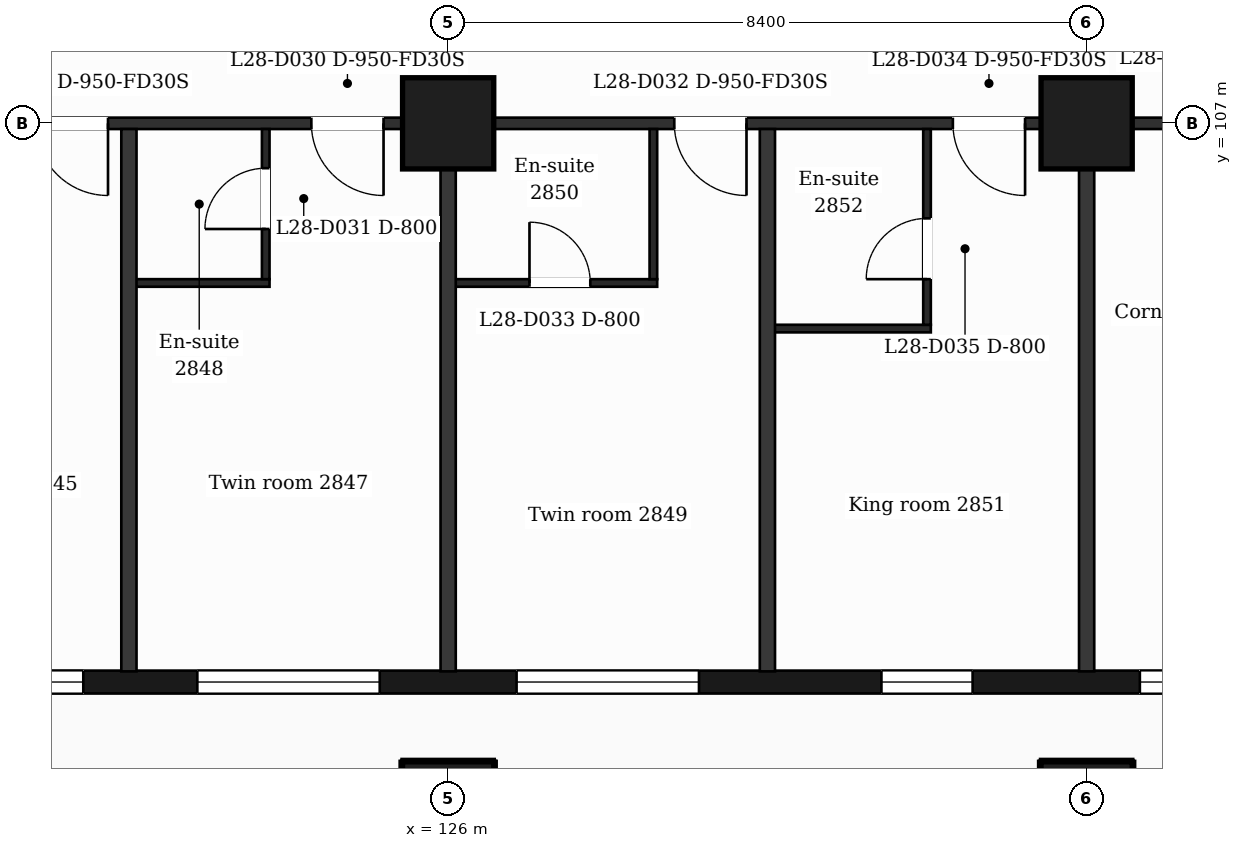
"""IFC4 building model, lengths in metres.
Left out: names, types, materials, properties, quantities, classifications, styles, units other than length and angle.
Written with IfcOpenShell. Run it as: python <this file> out.ifc"""

import sys

from ifc_helpers import new_model, si_unit, direction, frame, frame_2d, origin, origin_2d, place, context, subcontext, project, spatial, rectangle, extrude, element, fill, save


model = new_model("IFC4")
c1 = context("Model", 3, precision=1e-05, world=origin(), true_north=direction((0.0, 1.0)))
c2 = subcontext(c1, "Body", "Model", "MODEL_VIEW")
j1 = project(units=[si_unit("LENGTHUNIT", "METRE"), si_unit("PLANEANGLEUNIT", "RADIAN")], contexts=[c1])
p1 = place(None, origin())
s1 = spatial("IfcSite", under=j1, at=p1, CompositionType="ELEMENT")
p2 = place(p1, origin())
s2 = spatial("IfcBuilding", under=s1, at=p2, CompositionType="ELEMENT")
p3 = place(p2, frame((0.0, 0.0, 120.6)))
s3 = spatial("IfcBuildingStorey", under=s2, at=p3, CompositionType="ELEMENT", Elevation=120.6)
for number, where, z_axis, x_axis in (
    (1, (126.0, 98.0, 0.0), (0.0, 0.0, 1.0), (1.0, 0.0, 0.0)),
    (2, (134.4, 98.0, 0.0), (0.0, 0.0, 1.0), (1.0, 0.0, 0.0)),
    (3, (126.0, 107.0, 0.0), (0.0, 0.0, 1.0), (1.0, 0.0, 0.0)),
    (4, (134.4, 107.0, 0.0), (0.0, 0.0, 1.0), (1.0, 0.0, 0.0)),
):
    element("IfcColumn", number, at=place(p3, frame(where, z_axis=z_axis, x_axis=x_axis)), inside=s3, PredefinedType="COLUMN", context=c2, shape_type="SweptSolid", body=[
        extrude(rectangle(XDim=1.2, YDim=1.2, at=origin_2d()), origin(), (0.0, 0.0, 1.0), 3.7),
    ])
p4 = place(p3, frame((89.85, 99.65, 0.0), z_axis=(0.0, 0.0, 1.0), x_axis=(1.0, 0.0, 0.0)))
e5 = element("IfcWall", 5, at=p4, inside=s3, PredefinedType="SOLIDWALL", context=c2, shape_type="SweptSolid", body=[
    extrude(rectangle(XDim=47.25, YDim=0.3, at=frame_2d((23.625, 0.0))), origin(), (0.0, 0.0, 1.0), 3.38),
])
p5 = place(p4, frame((0.725, 0.0, 0.9)))
e6 = element("IfcOpeningElement", 6, at=p5, cuts=e5, PredefinedType="OPENING", context=c2, shape_type="SweptSolid", body=[
    extrude(rectangle(XDim=1.2, YDim=2.1, at=frame_2d((0.6, 1.05))), frame((0.0, 0.16, 0.0), z_axis=(0.0, -1.0, 0.0), x_axis=(1.0, 0.0, 0.0)), (0.0, 0.0, 1.0), 0.32),
])
p6 = place(p4, frame((3.45, 0.0, 0.9)))
e7 = element("IfcOpeningElement", 7, at=p6, cuts=e5, PredefinedType="OPENING", context=c2, shape_type="SweptSolid", body=[
    extrude(rectangle(XDim=2.4, YDim=2.1, at=frame_2d((1.2, 1.05))), frame((0.0, 0.16, 0.0), z_axis=(0.0, -1.0, 0.0), x_axis=(1.0, 0.0, 0.0)), (0.0, 0.0, 1.0), 0.32),
])
p7 = place(p4, frame((7.65, 0.0, 0.9)))
e8 = element("IfcOpeningElement", 8, at=p7, cuts=e5, PredefinedType="OPENING", context=c2, shape_type="SweptSolid", body=[
    extrude(rectangle(XDim=2.4, YDim=2.1, at=frame_2d((1.2, 1.05))), frame((0.0, 0.16, 0.0), z_axis=(0.0, -1.0, 0.0), x_axis=(1.0, 0.0, 0.0)), (0.0, 0.0, 1.0), 0.32),
])
p8 = place(p4, frame((12.45, 0.0, 0.9)))
e9 = element("IfcOpeningElement", 9, at=p8, cuts=e5, PredefinedType="OPENING", context=c2, shape_type="SweptSolid", body=[
    extrude(rectangle(XDim=1.2, YDim=2.1, at=frame_2d((0.6, 1.05))), frame((0.0, 0.16, 0.0), z_axis=(0.0, -1.0, 0.0), x_axis=(1.0, 0.0, 0.0)), (0.0, 0.0, 1.0), 0.32),
])
p9 = place(p4, frame((16.65, 0.0, 0.9)))
e10 = element("IfcOpeningElement", 10, at=p9, cuts=e5, PredefinedType="OPENING", context=c2, shape_type="SweptSolid", body=[
    extrude(rectangle(XDim=1.2, YDim=2.1, at=frame_2d((0.6, 1.05))), frame((0.0, 0.16, 0.0), z_axis=(0.0, -1.0, 0.0), x_axis=(1.0, 0.0, 0.0)), (0.0, 0.0, 1.0), 0.32),
])
p10 = place(p4, frame((19.95, 0.0, 0.0)))
e11 = element("IfcOpeningElement", 11, at=p10, cuts=e5, PredefinedType="OPENING", context=c2, shape_type="SweptSolid", body=[
    extrude(rectangle(XDim=1.2, YDim=2.4, at=frame_2d((0.6, 1.2))), frame((0.0, 0.16, 0.0), z_axis=(0.0, -1.0, 0.0), x_axis=(1.0, 0.0, 0.0)), (0.0, 0.0, 1.0), 0.32),
])
p11 = place(p4, frame((21.75, 0.0, 0.9)))
e12 = element("IfcOpeningElement", 12, at=p11, cuts=e5, PredefinedType="OPENING", context=c2, shape_type="SweptSolid", body=[
    extrude(rectangle(XDim=1.2, YDim=2.1, at=frame_2d((0.6, 1.05))), frame((0.0, 0.16, 0.0), z_axis=(0.0, -1.0, 0.0), x_axis=(1.0, 0.0, 0.0)), (0.0, 0.0, 1.0), 0.32),
])
p12 = place(p4, frame((24.45, 0.0, 0.9)))
e13 = element("IfcOpeningElement", 13, at=p12, cuts=e5, PredefinedType="OPENING", context=c2, shape_type="SweptSolid", body=[
    extrude(rectangle(XDim=2.4, YDim=2.1, at=frame_2d((1.2, 1.05))), frame((0.0, 0.16, 0.0), z_axis=(0.0, -1.0, 0.0), x_axis=(1.0, 0.0, 0.0)), (0.0, 0.0, 1.0), 0.32),
])
p13 = place(p4, frame((28.35, 0.0, 0.0)))
e14 = element("IfcOpeningElement", 14, at=p13, cuts=e5, PredefinedType="OPENING", context=c2, shape_type="SweptSolid", body=[
    extrude(rectangle(XDim=1.2, YDim=2.4, at=frame_2d((0.6, 1.2))), frame((0.0, 0.16, 0.0), z_axis=(0.0, -1.0, 0.0), x_axis=(1.0, 0.0, 0.0)), (0.0, 0.0, 1.0), 0.32),
])
p14 = place(p4, frame((30.15, 0.0, 0.9)))
e15 = element("IfcOpeningElement", 15, at=p14, cuts=e5, PredefinedType="OPENING", context=c2, shape_type="SweptSolid", body=[
    extrude(rectangle(XDim=1.2, YDim=2.1, at=frame_2d((0.6, 1.05))), frame((0.0, 0.16, 0.0), z_axis=(0.0, -1.0, 0.0), x_axis=(1.0, 0.0, 0.0)), (0.0, 0.0, 1.0), 0.32),
])
p15 = place(p4, frame((32.85, 0.0, 0.9)))
e16 = element("IfcOpeningElement", 16, at=p15, cuts=e5, PredefinedType="OPENING", context=c2, shape_type="SweptSolid", body=[
    extrude(rectangle(XDim=2.4, YDim=2.1, at=frame_2d((1.2, 1.05))), frame((0.0, 0.16, 0.0), z_axis=(0.0, -1.0, 0.0), x_axis=(1.0, 0.0, 0.0)), (0.0, 0.0, 1.0), 0.32),
])
p16 = place(p4, frame((37.05, 0.0, 0.9)))
e17 = element("IfcOpeningElement", 17, at=p16, cuts=e5, PredefinedType="OPENING", context=c2, shape_type="SweptSolid", body=[
    extrude(rectangle(XDim=2.4, YDim=2.1, at=frame_2d((1.2, 1.05))), frame((0.0, 0.16, 0.0), z_axis=(0.0, -1.0, 0.0), x_axis=(1.0, 0.0, 0.0)), (0.0, 0.0, 1.0), 0.32),
])
p17 = place(p4, frame((41.85, 0.0, 0.9)))
e18 = element("IfcOpeningElement", 18, at=p17, cuts=e5, PredefinedType="OPENING", context=c2, shape_type="SweptSolid", body=[
    extrude(rectangle(XDim=1.2, YDim=2.1, at=frame_2d((0.6, 1.05))), frame((0.0, 0.16, 0.0), z_axis=(0.0, -1.0, 0.0), x_axis=(1.0, 0.0, 0.0)), (0.0, 0.0, 1.0), 0.32),
])
p18 = place(p4, frame((45.25, 0.0, 0.9)))
e19 = element("IfcOpeningElement", 19, at=p18, cuts=e5, PredefinedType="OPENING", context=c2, shape_type="SweptSolid", body=[
    extrude(rectangle(XDim=1.2, YDim=2.1, at=frame_2d((0.6, 1.05))), frame((0.0, 0.16, 0.0), z_axis=(0.0, -1.0, 0.0), x_axis=(1.0, 0.0, 0.0)), (0.0, 0.0, 1.0), 0.32),
])
p19 = place(p3, frame((130.2, 104.3, 0.0), z_axis=(0.0, 0.0, 1.0), x_axis=(1.0, 0.0, 0.0)))
e20 = element("IfcWall", 20, at=p19, inside=s3, PredefinedType="PARTITIONING", context=c2, shape_type="SweptSolid", body=[
    extrude(rectangle(XDim=2.15, YDim=0.1, at=frame_2d((1.075, 0.0))), origin(), (0.0, 0.0, 1.0), 3.38),
])
p20 = place(p3, frame((121.8, 104.9, 0.0), z_axis=(0.0, 0.0, 1.0), x_axis=(1.0, 0.0, 0.0)))
e21 = element("IfcWall", 21, at=p20, inside=s3, PredefinedType="PARTITIONING", context=c2, shape_type="SweptSolid", body=[
    extrude(rectangle(XDim=1.85, YDim=0.1, at=frame_2d((0.925, 0.0))), origin(), (0.0, 0.0, 1.0), 3.38),
])
p21 = place(p3, frame((126.0, 104.9, 0.0), z_axis=(0.0, 0.0, 1.0), x_axis=(1.0, 0.0, 0.0)))
e22 = element("IfcWall", 22, at=p21, inside=s3, PredefinedType="PARTITIONING", context=c2, shape_type="SweptSolid", body=[
    extrude(rectangle(XDim=2.75, YDim=0.1, at=frame_2d((1.375, 0.0))), origin(), (0.0, 0.0, 1.0), 3.38),
])
p22 = place(p21, frame((1.07, 0.0, 0.0)))
e23 = element("IfcOpeningElement", 23, at=p22, cuts=e22, PredefinedType="OPENING", context=c2, shape_type="SweptSolid", body=[
    extrude(rectangle(XDim=0.8, YDim=2.1, at=frame_2d((0.4, 1.05))), frame((0.0, 0.06, 0.0), z_axis=(0.0, -1.0, 0.0), x_axis=(1.0, 0.0, 0.0)), (0.0, 0.0, 1.0), 0.12),
])
p23 = place(p3, frame((87.018, 107.0, 0.0), z_axis=(0.0, 0.0, 1.0), x_axis=(1.0, 0.0, 0.0)))
e24 = element("IfcWall", 24, at=p23, inside=s3, PredefinedType="PARTITIONING", context=c2, shape_type="SweptSolid", body=[
    extrude(rectangle(XDim=52.765, YDim=0.15, at=frame_2d((26.382, 0.0))), origin(), (0.0, 0.0, 1.0), 3.38),
])
p24 = place(p23, frame((1.276, 0.0, 0.0)))
e25 = element("IfcOpeningElement", 25, at=p24, cuts=e24, PredefinedType="OPENING", context=c2, shape_type="SweptSolid", body=[
    extrude(rectangle(XDim=0.95, YDim=2.1, at=frame_2d((0.475, 1.05))), frame((0.0, 0.085, 0.0), z_axis=(0.0, -1.0, 0.0), x_axis=(1.0, 0.0, 0.0)), (0.0, 0.0, 1.0), 0.17),
])
p25 = place(p23, frame((6.192, 0.0, 0.0)))
e26 = element("IfcOpeningElement", 26, at=p25, cuts=e24, PredefinedType="OPENING", context=c2, shape_type="SweptSolid", body=[
    extrude(rectangle(XDim=0.95, YDim=2.1, at=frame_2d((0.475, 1.05))), frame((0.0, 0.085, 0.0), z_axis=(0.0, -1.0, 0.0), x_axis=(1.0, 0.0, 0.0)), (0.0, 0.0, 1.0), 0.17),
])
p26 = place(p23, frame((11.982, 0.0, 0.0)))
e27 = element("IfcOpeningElement", 27, at=p26, cuts=e24, PredefinedType="OPENING", context=c2, shape_type="SweptSolid", body=[
    extrude(rectangle(XDim=1.0, YDim=2.1, at=frame_2d((0.5, 1.05))), frame((0.0, 0.085, 0.0), z_axis=(0.0, -1.0, 0.0), x_axis=(1.0, 0.0, 0.0)), (0.0, 0.0, 1.0), 0.17),
])
p27 = place(p23, frame((14.582, 0.0, 0.0)))
e28 = element("IfcOpeningElement", 28, at=p27, cuts=e24, PredefinedType="OPENING", context=c2, shape_type="SweptSolid", body=[
    extrude(rectangle(XDim=0.95, YDim=2.1, at=frame_2d((0.475, 1.05))), frame((0.0, 0.085, 0.0), z_axis=(0.0, -1.0, 0.0), x_axis=(1.0, 0.0, 0.0)), (0.0, 0.0, 1.0), 0.17),
])
p28 = place(p23, frame((18.257, 0.0, 0.0)))
e29 = element("IfcOpeningElement", 29, at=p28, cuts=e24, PredefinedType="OPENING", context=c2, shape_type="SweptSolid", body=[
    extrude(rectangle(XDim=0.95, YDim=2.1, at=frame_2d((0.475, 1.05))), frame((0.0, 0.085, 0.0), z_axis=(0.0, -1.0, 0.0), x_axis=(1.0, 0.0, 0.0)), (0.0, 0.0, 1.0), 0.17),
])
p29 = place(p23, frame((22.992, 0.0, 0.0)))
e30 = element("IfcOpeningElement", 30, at=p29, cuts=e24, PredefinedType="OPENING", context=c2, shape_type="SweptSolid", body=[
    extrude(rectangle(XDim=0.95, YDim=2.1, at=frame_2d((0.475, 1.05))), frame((0.0, 0.085, 0.0), z_axis=(0.0, -1.0, 0.0), x_axis=(1.0, 0.0, 0.0)), (0.0, 0.0, 1.0), 0.17),
])
p30 = place(p23, frame((26.632, 0.0, 0.0)))
e31 = element("IfcOpeningElement", 31, at=p30, cuts=e24, PredefinedType="OPENING", context=c2, shape_type="SweptSolid", body=[
    extrude(rectangle(XDim=1.0, YDim=2.1, at=frame_2d((0.5, 1.05))), frame((0.0, 0.085, 0.0), z_axis=(0.0, -1.0, 0.0), x_axis=(1.0, 0.0, 0.0)), (0.0, 0.0, 1.0), 0.17),
])
p31 = place(p23, frame((33.557, 0.0, 0.0)))
e32 = element("IfcOpeningElement", 32, at=p31, cuts=e24, PredefinedType="OPENING", context=c2, shape_type="SweptSolid", body=[
    extrude(rectangle(XDim=0.95, YDim=2.1, at=frame_2d((0.475, 1.05))), frame((0.0, 0.085, 0.0), z_axis=(0.0, -1.0, 0.0), x_axis=(1.0, 0.0, 0.0)), (0.0, 0.0, 1.0), 0.17),
])
p32 = place(p23, frame((37.182, 0.0, 0.0)))
e33 = element("IfcOpeningElement", 33, at=p32, cuts=e24, PredefinedType="OPENING", context=c2, shape_type="SweptSolid", body=[
    extrude(rectangle(XDim=0.95, YDim=2.1, at=frame_2d((0.475, 1.05))), frame((0.0, 0.085, 0.0), z_axis=(0.0, -1.0, 0.0), x_axis=(1.0, 0.0, 0.0)), (0.0, 0.0, 1.0), 0.17),
])
p33 = place(p23, frame((41.957, 0.0, 0.0)))
e34 = element("IfcOpeningElement", 34, at=p33, cuts=e24, PredefinedType="OPENING", context=c2, shape_type="SweptSolid", body=[
    extrude(rectangle(XDim=0.95, YDim=2.1, at=frame_2d((0.475, 1.05))), frame((0.0, 0.085, 0.0), z_axis=(0.0, -1.0, 0.0), x_axis=(1.0, 0.0, 0.0)), (0.0, 0.0, 1.0), 0.17),
])
p34 = place(p23, frame((45.622, 0.0, 0.0)))
e35 = element("IfcOpeningElement", 35, at=p34, cuts=e24, PredefinedType="OPENING", context=c2, shape_type="SweptSolid", body=[
    extrude(rectangle(XDim=0.95, YDim=2.1, at=frame_2d((0.475, 1.05))), frame((0.0, 0.085, 0.0), z_axis=(0.0, -1.0, 0.0), x_axis=(1.0, 0.0, 0.0)), (0.0, 0.0, 1.0), 0.17),
])
p35 = place(p23, frame((48.56, 0.0, 0.0)))
e36 = element("IfcOpeningElement", 36, at=p35, cuts=e24, PredefinedType="OPENING", context=c2, shape_type="SweptSolid", body=[
    extrude(rectangle(XDim=0.95, YDim=2.1, at=frame_2d((0.475, 1.05))), frame((0.0, 0.085, 0.0), z_axis=(0.0, -1.0, 0.0), x_axis=(1.0, 0.0, 0.0)), (0.0, 0.0, 1.0), 0.17),
])
p36 = place(p3, frame((121.8, 99.79, 0.0), z_axis=(0.0, 0.0, 1.0), x_axis=(0.0, 1.0, 0.0)))
e37 = element("IfcWall", 37, at=p36, inside=s3, PredefinedType="PARTITIONING", context=c2, shape_type="SweptSolid", body=[
    extrude(rectangle(XDim=7.135, YDim=0.2, at=frame_2d((3.567, 0.0))), origin(), (0.0, 0.0, 1.0), 3.38),
])
p37 = place(p3, frame((123.6, 104.95, 0.0), z_axis=(0.0, 0.0, 1.0), x_axis=(0.0, 1.0, 0.0)))
e38 = element("IfcWall", 38, at=p37, inside=s3, PredefinedType="PARTITIONING", context=c2, shape_type="SweptSolid", body=[
    extrude(rectangle(XDim=1.975, YDim=0.1, at=frame_2d((0.988, 0.0))), origin(), (0.0, 0.0, 1.0), 3.38),
])
p38 = place(p37, frame((0.66, 0.0, 0.0)))
e39 = element("IfcOpeningElement", 39, at=p38, cuts=e38, PredefinedType="OPENING", context=c2, shape_type="SweptSolid", body=[
    extrude(rectangle(XDim=0.8, YDim=2.1, at=frame_2d((0.4, 1.05))), frame((0.0, 0.06, 0.0), z_axis=(0.0, -1.0, 0.0), x_axis=(1.0, 0.0, 0.0)), (0.0, 0.0, 1.0), 0.12),
])
p39 = place(p3, frame((126.0, 99.79, 0.0), z_axis=(0.0, 0.0, 1.0), x_axis=(0.0, 1.0, 0.0)))
e40 = element("IfcWall", 40, at=p39, inside=s3, PredefinedType="PARTITIONING", context=c2, shape_type="SweptSolid", body=[
    extrude(rectangle(XDim=7.135, YDim=0.2, at=frame_2d((3.567, 0.0))), origin(), (0.0, 0.0, 1.0), 3.38),
])
p40 = place(p3, frame((128.7, 104.95, 0.0), z_axis=(0.0, 0.0, 1.0), x_axis=(0.0, 1.0, 0.0)))
e41 = element("IfcWall", 41, at=p40, inside=s3, PredefinedType="PARTITIONING", context=c2, shape_type="SweptSolid", body=[
    extrude(rectangle(XDim=1.975, YDim=0.1, at=frame_2d((0.988, 0.0))), origin(), (0.0, 0.0, 1.0), 3.38),
])
p41 = place(p3, frame((130.2, 99.79, 0.0), z_axis=(0.0, 0.0, 1.0), x_axis=(0.0, 1.0, 0.0)))
e42 = element("IfcWall", 42, at=p41, inside=s3, PredefinedType="PARTITIONING", context=c2, shape_type="SweptSolid", body=[
    extrude(rectangle(XDim=7.135, YDim=0.2, at=frame_2d((3.567, 0.0))), origin(), (0.0, 0.0, 1.0), 3.38),
])
p42 = place(p3, frame((132.3, 104.35, 0.0), z_axis=(0.0, 0.0, 1.0), x_axis=(0.0, 1.0, 0.0)))
e43 = element("IfcWall", 43, at=p42, inside=s3, PredefinedType="PARTITIONING", context=c2, shape_type="SweptSolid", body=[
    extrude(rectangle(XDim=2.575, YDim=0.1, at=frame_2d((1.288, 0.0))), origin(), (0.0, 0.0, 1.0), 3.38),
])
p43 = place(p42, frame((0.6, 0.0, 0.0)))
e44 = element("IfcOpeningElement", 44, at=p43, cuts=e43, PredefinedType="OPENING", context=c2, shape_type="SweptSolid", body=[
    extrude(rectangle(XDim=0.8, YDim=2.1, at=frame_2d((0.4, 1.05))), frame((0.0, 0.06, 0.0), z_axis=(0.0, -1.0, 0.0), x_axis=(1.0, 0.0, 0.0)), (0.0, 0.0, 1.0), 0.12),
])
p44 = place(p3, frame((134.4, 99.79, 0.0), z_axis=(0.0, 0.0, 1.0), x_axis=(0.0, 1.0, 0.0)))
e45 = element("IfcWall", 45, at=p44, inside=s3, PredefinedType="PARTITIONING", context=c2, shape_type="SweptSolid", body=[
    extrude(rectangle(XDim=7.135, YDim=0.2, at=frame_2d((3.567, 0.0))), origin(), (0.0, 0.0, 1.0), 3.38),
])
p45 = place(p14, origin())
e46 = element("IfcWindow", 46, at=p45, inside=s3, PartitioningType="SINGLE_PANEL", PredefinedType="WINDOW", context=c2, shape_type="SweptSolid", body=[
    extrude(rectangle(XDim=1.2, YDim=2.1, at=frame_2d((0.6, 1.05))), frame((0.0, 0.03, 0.0), z_axis=(0.0, -1.0, 0.0), x_axis=(1.0, 0.0, 0.0)), (0.0, 0.0, 1.0), 0.06),
])
fill(e15, e46)
p46 = place(p15, origin())
e47 = element("IfcWindow", 47, at=p46, inside=s3, PartitioningType="SINGLE_PANEL", PredefinedType="WINDOW", context=c2, shape_type="SweptSolid", body=[
    extrude(rectangle(XDim=2.4, YDim=2.1, at=frame_2d((1.2, 1.05))), frame((0.0, 0.03, 0.0), z_axis=(0.0, -1.0, 0.0), x_axis=(1.0, 0.0, 0.0)), (0.0, 0.0, 1.0), 0.06),
])
fill(e16, e47)
p47 = place(p16, origin())
e48 = element("IfcWindow", 48, at=p47, inside=s3, PartitioningType="SINGLE_PANEL", PredefinedType="WINDOW", context=c2, shape_type="SweptSolid", body=[
    extrude(rectangle(XDim=2.4, YDim=2.1, at=frame_2d((1.2, 1.05))), frame((0.0, 0.03, 0.0), z_axis=(0.0, -1.0, 0.0), x_axis=(1.0, 0.0, 0.0)), (0.0, 0.0, 1.0), 0.06),
])
fill(e17, e48)
p48 = place(p17, origin())
e49 = element("IfcWindow", 49, at=p48, inside=s3, PartitioningType="SINGLE_PANEL", PredefinedType="WINDOW", context=c2, shape_type="SweptSolid", body=[
    extrude(rectangle(XDim=1.2, YDim=2.1, at=frame_2d((0.6, 1.05))), frame((0.0, 0.03, 0.0), z_axis=(0.0, -1.0, 0.0), x_axis=(1.0, 0.0, 0.0)), (0.0, 0.0, 1.0), 0.06),
])
fill(e18, e49)
p49 = place(p18, origin())
e50 = element("IfcWindow", 50, at=p49, inside=s3, PartitioningType="SINGLE_PANEL", PredefinedType="WINDOW", context=c2, shape_type="SweptSolid", body=[
    extrude(rectangle(XDim=1.2, YDim=2.1, at=frame_2d((0.6, 1.05))), frame((0.0, 0.03, 0.0), z_axis=(0.0, -1.0, 0.0), x_axis=(1.0, 0.0, 0.0)), (0.0, 0.0, 1.0), 0.06),
])
fill(e19, e50)
p50 = place(p31, origin())
e51 = element("IfcDoor", 51, at=p50, inside=s3, OperationType="SINGLE_SWING_RIGHT", PredefinedType="DOOR", context=c2, shape_type="SweptSolid", body=[
    extrude(rectangle(XDim=0.95, YDim=2.1, at=frame_2d((0.475, 1.05))), frame((0.0, 0.025, 0.0), z_axis=(0.0, -1.0, 0.0), x_axis=(1.0, 0.0, 0.0)), (0.0, 0.0, 1.0), 0.05),
])
fill(e32, e51)
p51 = place(p32, origin())
e52 = element("IfcDoor", 52, at=p51, inside=s3, OperationType="SINGLE_SWING_RIGHT", PredefinedType="DOOR", context=c2, shape_type="SweptSolid", body=[
    extrude(rectangle(XDim=0.95, YDim=2.1, at=frame_2d((0.475, 1.05))), frame((0.0, 0.025, 0.0), z_axis=(0.0, -1.0, 0.0), x_axis=(1.0, 0.0, 0.0)), (0.0, 0.0, 1.0), 0.05),
])
fill(e33, e52)
p52 = place(p38, origin())
e53 = element("IfcDoor", 53, at=p52, inside=s3, OperationType="SINGLE_SWING_LEFT", PredefinedType="DOOR", context=c2, shape_type="SweptSolid", body=[
    extrude(rectangle(XDim=0.8, YDim=2.1, at=frame_2d((0.4, 1.05))), frame((0.0, 0.025, 0.0), z_axis=(0.0, -1.0, 0.0), x_axis=(1.0, 0.0, 0.0)), (0.0, 0.0, 1.0), 0.05),
])
fill(e39, e53)
p53 = place(p33, origin())
e54 = element("IfcDoor", 54, at=p53, inside=s3, OperationType="SINGLE_SWING_RIGHT", PredefinedType="DOOR", context=c2, shape_type="SweptSolid", body=[
    extrude(rectangle(XDim=0.95, YDim=2.1, at=frame_2d((0.475, 1.05))), frame((0.0, 0.025, 0.0), z_axis=(0.0, -1.0, 0.0), x_axis=(1.0, 0.0, 0.0)), (0.0, 0.0, 1.0), 0.05),
])
fill(e34, e54)
p54 = place(p22, origin())
e55 = element("IfcDoor", 55, at=p54, inside=s3, OperationType="SINGLE_SWING_LEFT", PredefinedType="DOOR", context=c2, shape_type="SweptSolid", body=[
    extrude(rectangle(XDim=0.8, YDim=2.1, at=frame_2d((0.4, 1.05))), frame((0.0, 0.025, 0.0), z_axis=(0.0, -1.0, 0.0), x_axis=(1.0, 0.0, 0.0)), (0.0, 0.0, 1.0), 0.05),
])
fill(e23, e55)
p55 = place(p34, origin())
e56 = element("IfcDoor", 56, at=p55, inside=s3, OperationType="SINGLE_SWING_RIGHT", PredefinedType="DOOR", context=c2, shape_type="SweptSolid", body=[
    extrude(rectangle(XDim=0.95, YDim=2.1, at=frame_2d((0.475, 1.05))), frame((0.0, 0.025, 0.0), z_axis=(0.0, -1.0, 0.0), x_axis=(1.0, 0.0, 0.0)), (0.0, 0.0, 1.0), 0.05),
])
fill(e35, e56)
p56 = place(p43, origin())
e57 = element("IfcDoor", 57, at=p56, inside=s3, OperationType="SINGLE_SWING_LEFT", PredefinedType="DOOR", context=c2, shape_type="SweptSolid", body=[
    extrude(rectangle(XDim=0.8, YDim=2.1, at=frame_2d((0.4, 1.05))), frame((0.0, 0.025, 0.0), z_axis=(0.0, -1.0, 0.0), x_axis=(1.0, 0.0, 0.0)), (0.0, 0.0, 1.0), 0.05),
])
fill(e44, e57)
save(model, sys.argv[1])
